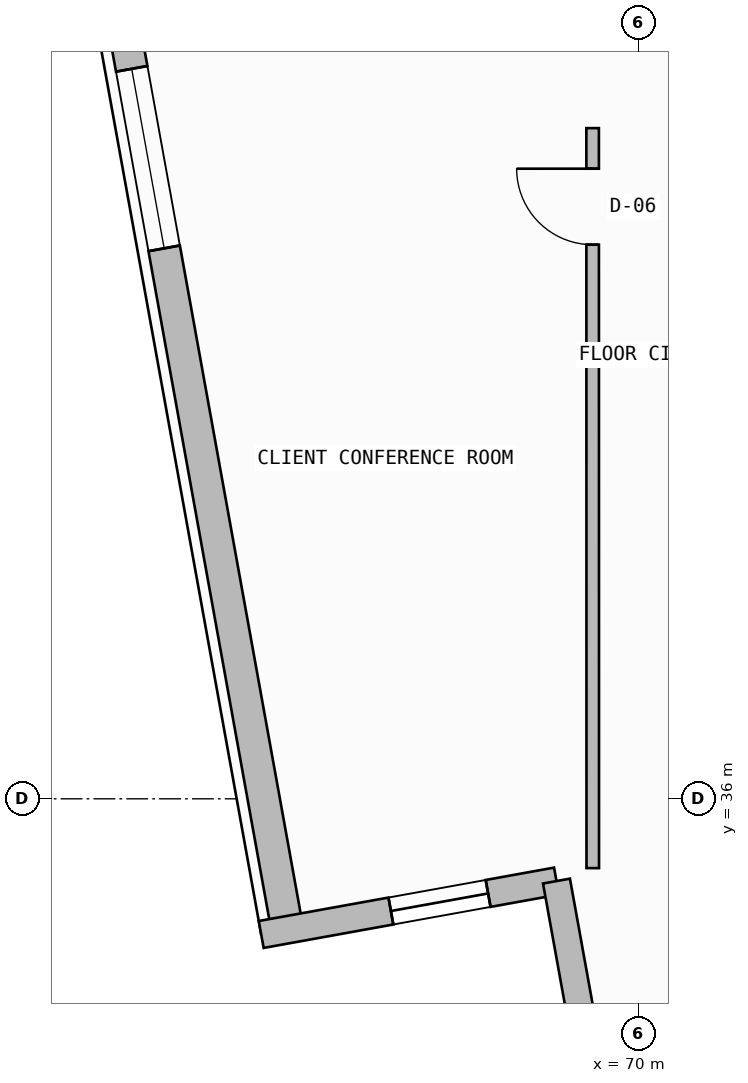
"""IFC4 building model, lengths in metres.
Left out: names, types, materials, properties, quantities, classifications, styles, units other than length and angle.
Written with IfcOpenShell. Run it as: python <this file> out.ifc"""

import sys

from ifc_helpers import new_model, si_unit, direction, frame, frame_2d, origin, place, context, subcontext, project, spatial, rectangle, extrude, element, fill, save


model = new_model("IFC4")
c1 = context("Model", 3, precision=1e-05, world=origin(), true_north=direction((0.0, 1.0)))
c2 = subcontext(c1, "Body", "Model", "MODEL_VIEW")
j1 = project(units=[si_unit("LENGTHUNIT", "METRE"), si_unit("PLANEANGLEUNIT", "RADIAN")], contexts=[c1])
p1 = place(None, origin())
s1 = spatial("IfcSite", under=j1, at=p1, CompositionType="ELEMENT")
p2 = place(p1, origin())
s2 = spatial("IfcBuilding", under=s1, at=p2, CompositionType="ELEMENT")
p3 = place(p2, frame((0.0, 0.0, 120.9)))
s3 = spatial("IfcBuildingStorey", under=s2, at=p3, CompositionType="ELEMENT", Elevation=120.9)
p4 = place(p3, frame((69.565, 31.377, 0.0), z_axis=(0.0, 0.0, 1.0), x_axis=(0.98404091451, 0.177942346197, 0.0)))
e1 = element("IfcWall", 1, at=p4, inside=s3, PredefinedType="SOLIDWALL", context=c2, shape_type="SweptSolid", body=[
    extrude(rectangle(XDim=15.583, YDim=0.42, at=frame_2d((7.792, 0.0))), origin(), (0.0, 0.0, 1.0), 3.34),
])
p5 = place(p4, frame((10.5, 0.0, 1.2)))
e2 = element("IfcOpeningElement", 2, at=p5, cuts=e1, PredefinedType="OPENING", context=c2, shape_type="SweptSolid", body=[
    extrude(rectangle(XDim=2.4, YDim=0.9, at=frame_2d((1.2, 0.45))), frame((0.0, 0.22, 0.0), z_axis=(0.0, -1.0, 0.0), x_axis=(1.0, 0.0, 0.0)), (0.0, 0.0, 1.0), 0.44),
])
p6 = place(p3, frame((62.99, 47.518, 0.0), z_axis=(0.0, 0.0, 1.0), x_axis=(0.177948058674, -0.984039881516, 0.0)))
e3 = element("IfcWall", 3, at=p6, inside=s3, PredefinedType="SOLIDWALL", context=c2, shape_type="SweptSolid", body=[
    extrude(rectangle(XDim=13.455, YDim=0.42, at=frame_2d((6.728, 0.0))), origin(), (0.0, 0.0, 1.0), 2.725),
])
p7 = place(p6, frame((1.945, 0.0, 1.2)))
e4 = element("IfcOpeningElement", 4, at=p7, cuts=e3, PredefinedType="OPENING", context=c2, shape_type="SweptSolid", body=[
    extrude(rectangle(XDim=2.4, YDim=0.9, at=frame_2d((1.2, 0.45))), frame((0.0, 0.22, 0.0), z_axis=(0.0, -1.0, 0.0), x_axis=(1.0, 0.0, 0.0)), (0.0, 0.0, 1.0), 0.44),
])
p8 = place(p3, frame((65.039, 34.215, 0.0), z_axis=(0.0, 0.0, 1.0), x_axis=(0.984046535247, 0.177911260096, 0.0)))
e5 = element("IfcWall", 5, at=p8, inside=s3, PredefinedType="SOLIDWALL", context=c2, shape_type="SweptSolid", body=[
    extrude(rectangle(XDim=3.948, YDim=0.36, at=frame_2d((1.974, 0.0))), origin(), (0.0, 0.0, 1.0), 3.34),
])
p9 = place(p8, frame((1.734, 0.0, 0.45)))
e6 = element("IfcOpeningElement", 6, at=p9, cuts=e5, PredefinedType="OPENING", context=c2, shape_type="SweptSolid", body=[
    extrude(rectangle(XDim=1.3, YDim=2.4, at=frame_2d((0.65, 1.2))), frame((0.0, 0.19, 0.0), z_axis=(0.0, -1.0, 0.0), x_axis=(1.0, 0.0, 0.0)), (0.0, 0.0, 1.0), 0.38),
])
p10 = place(p3, frame((68.924, 34.917, 0.0), z_axis=(0.0, 0.0, 1.0), x_axis=(0.177981971326, -0.984033748346, 0.0)))
e7 = element("IfcWall", 7, at=p10, inside=s3, PredefinedType="SOLIDWALL", context=c2, shape_type="SweptSolid", body=[
    extrude(rectangle(XDim=3.948, YDim=0.36, at=frame_2d((1.974, 0.0))), origin(), (0.0, 0.0, 1.0), 3.34),
])
p11 = place(p3, frame((69.4, 44.823, 0.0), z_axis=(0.0, 0.0, 1.0), x_axis=(0.000175544184, -0.999999984592, 0.0)))
e8 = element("IfcWall", 8, at=p11, inside=s3, PredefinedType="PARTITIONING", context=c2, shape_type="SweptSolid", body=[
    extrude(rectangle(XDim=9.735, YDim=0.165, at=frame_2d((4.868, 0.0))), origin(), (0.0, 0.0, 1.0), 3.34),
])
p12 = place(p11, frame((0.533, 0.0, 0.0)))
e9 = element("IfcOpeningElement", 9, at=p12, cuts=e8, PredefinedType="OPENING", context=c2, shape_type="SweptSolid", body=[
    extrude(rectangle(XDim=1.0, YDim=2.2, at=frame_2d((0.5, 1.1))), frame((0.0, 0.093, 0.0), z_axis=(0.0, -1.0, 0.0), x_axis=(1.0, 0.0, 0.0)), (0.0, 0.0, 1.0), 0.185),
])
p13 = place(p7, origin())
e10 = element("IfcWindow", 10, at=p13, inside=s3, PartitioningType="SINGLE_PANEL", PredefinedType="WINDOW", context=c2, shape_type="SweptSolid", body=[
    extrude(rectangle(XDim=2.4, YDim=0.9, at=frame_2d((1.2, 0.45))), frame((0.0, 0.03, 0.0), z_axis=(0.0, -1.0, 0.0), x_axis=(1.0, 0.0, 0.0)), (0.0, 0.0, 1.0), 0.06),
])
fill(e4, e10)
p14 = place(p9, origin())
e11 = element("IfcWindow", 11, at=p14, inside=s3, PartitioningType="SINGLE_PANEL", PredefinedType="WINDOW", context=c2, shape_type="SweptSolid", body=[
    extrude(rectangle(XDim=1.3, YDim=2.4, at=frame_2d((0.65, 1.2))), frame((0.0, 0.03, 0.0), z_axis=(0.0, -1.0, 0.0), x_axis=(1.0, 0.0, 0.0)), (0.0, 0.0, 1.0), 0.06),
])
fill(e6, e11)
p15 = place(p12, frame((1.0, 0.0, 0.0), z_axis=(0.0, 0.0, 1.0), x_axis=(-1.0, 0.0, 0.0)))
e12 = element("IfcDoor", 12, at=p15, inside=s3, OperationType="SINGLE_SWING_RIGHT", PredefinedType="DOOR", context=c2, shape_type="SweptSolid", body=[
    extrude(rectangle(XDim=1.0, YDim=2.2, at=frame_2d((0.5, 1.1))), frame((0.0, 0.025, 0.0), z_axis=(0.0, -1.0, 0.0), x_axis=(1.0, 0.0, 0.0)), (0.0, 0.0, 1.0), 0.05),
])
fill(e9, e12)
save(model, sys.argv[1])
